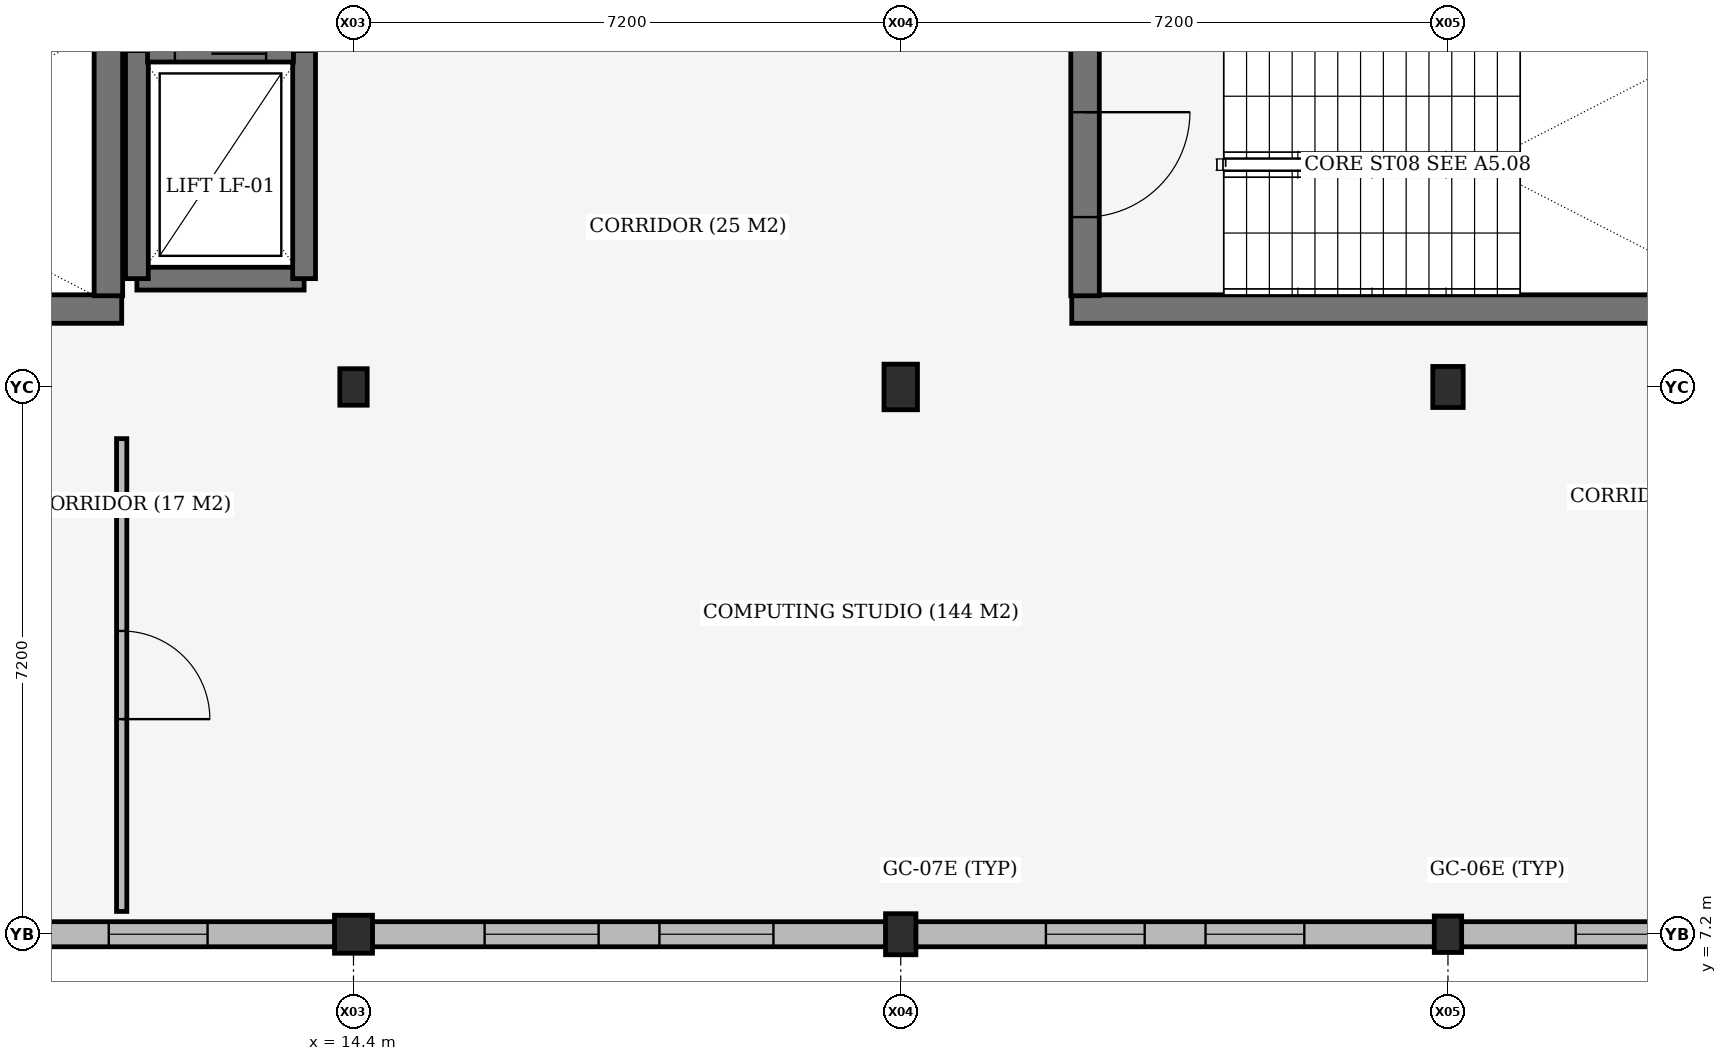
"""IFC4 building model, lengths in metres.
Left out: names, types, materials, properties, quantities, classifications, styles, units other than length and angle.
Written with IfcOpenShell. Run it as: python <this file> out.ifc"""

import sys

from ifc_helpers import new_model, si_unit, direction, frame, frame_2d, origin, origin_2d, place, context, subcontext, project, spatial, rectangle, extrude, element, fill, save


model = new_model("IFC4")
c1 = context("Model", 3, precision=1e-05, world=origin(), true_north=direction((0.0, 1.0)))
c2 = subcontext(c1, "Body", "Model", "MODEL_VIEW")
j1 = project(units=[si_unit("LENGTHUNIT", "METRE"), si_unit("PLANEANGLEUNIT", "RADIAN")], contexts=[c1])
p1 = place(None, origin())
s1 = spatial("IfcSite", under=j1, at=p1, CompositionType="ELEMENT")
p2 = place(p1, origin())
s2 = spatial("IfcBuilding", under=s1, at=p2, CompositionType="ELEMENT")
p3 = place(p2, frame((0.0, 0.0, 18.0)))
s3 = spatial("IfcBuildingStorey", under=s2, at=p3, CompositionType="ELEMENT", Elevation=18.0)
p4 = place(p3, frame((14.4, 7.2, 0.0), z_axis=(0.0, 0.0, 1.0), x_axis=(1.0, 0.0, 0.0)))
e1 = element("IfcColumn", 1, at=p4, inside=s3, PredefinedType="COLUMN", context=c2, shape_type="SweptSolid", body=[
    extrude(rectangle(XDim=0.5, YDim=0.5, at=origin_2d()), origin(), (0.0, 0.0, 1.0), 3.935),
])
p5 = place(p3, frame((14.4, 14.4, 0.0), z_axis=(0.0, 0.0, 1.0), x_axis=(1.0, 0.0, 0.0)))
e2 = element("IfcColumn", 2, at=p5, inside=s3, PredefinedType="COLUMN", context=c2, shape_type="SweptSolid", body=[
    extrude(rectangle(XDim=0.36, YDim=0.48, at=origin_2d()), origin(), (0.0, 0.0, 1.0), 3.935),
])
p6 = place(p3, frame((21.6, 7.2, 0.0), z_axis=(0.0, 0.0, 1.0), x_axis=(1.0, 0.0, 0.0)))
e3 = element("IfcColumn", 3, at=p6, inside=s3, PredefinedType="COLUMN", context=c2, shape_type="SweptSolid", body=[
    extrude(rectangle(XDim=0.4, YDim=0.54, at=origin_2d()), origin(), (0.0, 0.0, 1.0), 3.935),
])
p7 = place(p3, frame((21.6, 14.4, 0.0), z_axis=(0.0, 0.0, 1.0), x_axis=(1.0, 0.0, 0.0)))
e4 = element("IfcColumn", 4, at=p7, inside=s3, PredefinedType="COLUMN", context=c2, shape_type="SweptSolid", body=[
    extrude(rectangle(XDim=0.44, YDim=0.6, at=origin_2d()), origin(), (0.0, 0.0, 1.0), 3.935),
])
p8 = place(p3, frame((28.8, 7.2, 0.0), z_axis=(0.0, 0.0, 1.0), x_axis=(1.0, 0.0, 0.0)))
e5 = element("IfcColumn", 5, at=p8, inside=s3, PredefinedType="COLUMN", context=c2, shape_type="SweptSolid", body=[
    extrude(rectangle(XDim=0.36, YDim=0.48, at=origin_2d()), origin(), (0.0, 0.0, 1.0), 3.935),
])
p9 = place(p3, frame((28.8, 14.4, 0.0), z_axis=(0.0, 0.0, 1.0), x_axis=(1.0, 0.0, 0.0)))
e6 = element("IfcColumn", 6, at=p9, inside=s3, PredefinedType="COLUMN", context=c2, shape_type="SweptSolid", body=[
    extrude(rectangle(XDim=0.4, YDim=0.54, at=origin_2d()), origin(), (0.0, 0.0, 1.0), 3.935),
])
p10 = place(p3, frame((2.25, 15.425, 0.0), z_axis=(0.0, 0.0, 1.0), x_axis=(1.0, 0.0, 0.0)))
e7 = element("IfcWall", 7, at=p10, inside=s3, PredefinedType="SHEAR", context=c2, shape_type="SweptSolid", body=[
    extrude(rectangle(XDim=9.1, YDim=0.375, at=frame_2d((4.55, 0.0))), origin(), (0.0, 0.0, 1.0), 3.935),
])
p11 = place(p3, frame((11.175, 15.6, 0.0), z_axis=(0.0, 0.0, 1.0), x_axis=(0.0, 1.0, 0.0)))
e8 = element("IfcWall", 8, at=p11, inside=s3, PredefinedType="SHEAR", context=c2, shape_type="SweptSolid", body=[
    extrude(rectangle(XDim=3.45, YDim=0.375, at=frame_2d((1.725, 0.0))), origin(), (0.0, 0.0, 1.0), 3.935),
])
p12 = place(p3, frame((23.85, 15.425, 0.0), z_axis=(0.0, 0.0, 1.0), x_axis=(1.0, 0.0, 0.0)))
e9 = element("IfcWall", 9, at=p12, inside=s3, PredefinedType="SHEAR", context=c2, shape_type="SweptSolid", body=[
    extrude(rectangle(XDim=9.1, YDim=0.375, at=frame_2d((4.55, 0.0))), origin(), (0.0, 0.0, 1.0), 3.935),
])
p13 = place(p3, frame((11.55, 15.825, 0.0), z_axis=(0.0, 0.0, 1.0), x_axis=(1.0, 0.0, 0.0)))
e10 = element("IfcWall", 10, at=p13, inside=s3, PredefinedType="SHEAR", context=c2, shape_type="SweptSolid", body=[
    extrude(rectangle(XDim=2.2, YDim=0.3, at=frame_2d((1.1, 0.0))), origin(), (0.0, 0.0, 1.0), 3.935),
])
for number, where, z_axis, x_axis in (
    (11, (11.55, 18.825, 0.0), (0.0, 0.0, 1.0), (0.0, -1.0, 0.0)),
    (12, (13.75, 15.825, 0.0), (0.0, 0.0, 1.0), (0.0, 1.0, 0.0)),
):
    element("IfcWall", number, at=place(p3, frame(where, z_axis=z_axis, x_axis=x_axis)), inside=s3, PredefinedType="SHEAR", context=c2, shape_type="SweptSolid", body=[
        extrude(rectangle(XDim=3.0, YDim=0.3, at=frame_2d((1.5, 0.0))), origin(), (0.0, 0.0, 1.0), 3.935),
    ])
p14 = place(p3, frame((14.158, 7.2, 0.0), z_axis=(0.0, 0.0, 1.0), x_axis=(-1.0, 0.0, 0.0)))
e13 = element("IfcWall", 13, at=p14, inside=s3, PredefinedType="STANDARD", context=c2, shape_type="SweptSolid", body=[
    extrude(rectangle(XDim=6.756, YDim=0.33, at=frame_2d((3.378, 0.0))), origin(), (0.0, 0.0, 1.0), 3.255),
])
p15 = place(p14, frame((1.678, 0.0, 0.95)))
e14 = element("IfcOpeningElement", 14, at=p15, cuts=e13, PredefinedType="OPENING", context=c2, shape_type="SweptSolid", body=[
    extrude(rectangle(XDim=1.3, YDim=1.8, at=frame_2d((0.65, 0.9))), frame((0.0, 0.175, 0.0), z_axis=(0.0, -1.0, 0.0), x_axis=(1.0, 0.0, 0.0)), (0.0, 0.0, 1.0), 0.35),
])
p16 = place(p14, frame((3.778, 0.0, 0.95)))
e15 = element("IfcOpeningElement", 15, at=p16, cuts=e13, PredefinedType="OPENING", context=c2, shape_type="SweptSolid", body=[
    extrude(rectangle(XDim=1.3, YDim=1.8, at=frame_2d((0.65, 0.9))), frame((0.0, 0.175, 0.0), z_axis=(0.0, -1.0, 0.0), x_axis=(1.0, 0.0, 0.0)), (0.0, 0.0, 1.0), 0.35),
])
p17 = place(p3, frame((21.408, 7.2, 0.0), z_axis=(0.0, 0.0, 1.0), x_axis=(-1.0, 0.0, 0.0)))
e16 = element("IfcWall", 16, at=p17, inside=s3, PredefinedType="STANDARD", context=c2, shape_type="SweptSolid", body=[
    extrude(rectangle(XDim=6.766, YDim=0.33, at=frame_2d((3.383, 0.0))), origin(), (0.0, 0.0, 1.0), 3.195),
])
p18 = place(p17, frame((1.483, 0.0, 0.95)))
e17 = element("IfcOpeningElement", 17, at=p18, cuts=e16, PredefinedType="OPENING", context=c2, shape_type="SweptSolid", body=[
    extrude(rectangle(XDim=1.5, YDim=1.8, at=frame_2d((0.75, 0.9))), frame((0.0, 0.175, 0.0), z_axis=(0.0, -1.0, 0.0), x_axis=(1.0, 0.0, 0.0)), (0.0, 0.0, 1.0), 0.35),
])
p19 = place(p17, frame((3.783, 0.0, 0.95)))
e18 = element("IfcOpeningElement", 18, at=p19, cuts=e16, PredefinedType="OPENING", context=c2, shape_type="SweptSolid", body=[
    extrude(rectangle(XDim=1.5, YDim=1.8, at=frame_2d((0.75, 0.9))), frame((0.0, 0.175, 0.0), z_axis=(0.0, -1.0, 0.0), x_axis=(1.0, 0.0, 0.0)), (0.0, 0.0, 1.0), 0.35),
])
p20 = place(p3, frame((28.628, 7.2, 0.0), z_axis=(0.0, 0.0, 1.0), x_axis=(-1.0, 0.0, 0.0)))
e19 = element("IfcWall", 19, at=p20, inside=s3, PredefinedType="STANDARD", context=c2, shape_type="SweptSolid", body=[
    extrude(rectangle(XDim=6.836, YDim=0.33, at=frame_2d((3.418, 0.0))), origin(), (0.0, 0.0, 1.0), 3.415),
])
p21 = place(p20, frame((1.718, 0.0, 0.95)))
e20 = element("IfcOpeningElement", 20, at=p21, cuts=e19, PredefinedType="OPENING", context=c2, shape_type="SweptSolid", body=[
    extrude(rectangle(XDim=1.3, YDim=1.8, at=frame_2d((0.65, 0.9))), frame((0.0, 0.175, 0.0), z_axis=(0.0, -1.0, 0.0), x_axis=(1.0, 0.0, 0.0)), (0.0, 0.0, 1.0), 0.35),
])
p22 = place(p20, frame((3.818, 0.0, 0.95)))
e21 = element("IfcOpeningElement", 21, at=p22, cuts=e19, PredefinedType="OPENING", context=c2, shape_type="SweptSolid", body=[
    extrude(rectangle(XDim=1.3, YDim=1.8, at=frame_2d((0.65, 0.9))), frame((0.0, 0.175, 0.0), z_axis=(0.0, -1.0, 0.0), x_axis=(1.0, 0.0, 0.0)), (0.0, 0.0, 1.0), 0.35),
])
p23 = place(p3, frame((35.788, 7.2, 0.0), z_axis=(0.0, 0.0, 1.0), x_axis=(-1.0, 0.0, 0.0)))
e22 = element("IfcWall", 22, at=p23, inside=s3, PredefinedType="STANDARD", context=c2, shape_type="SweptSolid", body=[
    extrude(rectangle(XDim=6.816, YDim=0.33, at=frame_2d((3.408, 0.0))), origin(), (0.0, 0.0, 1.0), 3.355),
])
p24 = place(p23, frame((1.508, 0.0, 0.95)))
e23 = element("IfcOpeningElement", 23, at=p24, cuts=e22, PredefinedType="OPENING", context=c2, shape_type="SweptSolid", body=[
    extrude(rectangle(XDim=1.5, YDim=1.8, at=frame_2d((0.75, 0.9))), frame((0.0, 0.175, 0.0), z_axis=(0.0, -1.0, 0.0), x_axis=(1.0, 0.0, 0.0)), (0.0, 0.0, 1.0), 0.35),
])
p25 = place(p23, frame((3.808, 0.0, 0.95)))
e24 = element("IfcOpeningElement", 24, at=p25, cuts=e22, PredefinedType="OPENING", context=c2, shape_type="SweptSolid", body=[
    extrude(rectangle(XDim=1.5, YDim=1.8, at=frame_2d((0.75, 0.9))), frame((0.0, 0.175, 0.0), z_axis=(0.0, -1.0, 0.0), x_axis=(1.0, 0.0, 0.0)), (0.0, 0.0, 1.0), 0.35),
])
p26 = place(p3, frame((24.025, 19.05, 0.0), z_axis=(0.0, 0.0, 1.0), x_axis=(0.0, -1.0, 0.0)))
e25 = element("IfcWall", 25, at=p26, inside=s3, PredefinedType="SHEAR", context=c2, shape_type="SweptSolid", body=[
    extrude(rectangle(XDim=3.45, YDim=0.375, at=frame_2d((1.725, 0.0))), origin(), (0.0, 0.0, 1.0), 3.935),
])
p27 = place(p26, frame((1.035, 0.0, 0.0)))
e26 = element("IfcOpeningElement", 26, at=p27, cuts=e25, PredefinedType="OPENING", context=c2, shape_type="SweptSolid", body=[
    extrude(rectangle(XDim=1.38, YDim=2.2, at=frame_2d((0.69, 1.1))), frame((0.0, 0.198, 0.0), z_axis=(0.0, -1.0, 0.0), x_axis=(1.0, 0.0, 0.0)), (0.0, 0.0, 1.0), 0.395),
])
p28 = place(p3, frame((11.69, 18.825, 0.0), z_axis=(0.0, 0.0, 1.0), x_axis=(1.0, 0.0, 0.0)))
e27 = element("IfcWall", 27, at=p28, inside=s3, PredefinedType="SHEAR", context=c2, shape_type="SweptSolid", body=[
    extrude(rectangle(XDim=1.92, YDim=0.3, at=frame_2d((0.96, 0.0))), origin(), (0.0, 0.0, 1.0), 3.935),
])
p29 = place(p28, frame((0.36, 0.0, 0.0)))
e28 = element("IfcOpeningElement", 28, at=p29, cuts=e27, PredefinedType="OPENING", context=c2, shape_type="SweptSolid", body=[
    extrude(rectangle(XDim=1.2, YDim=2.1, at=frame_2d((0.6, 1.05))), frame((0.0, 0.16, 0.0), z_axis=(0.0, -1.0, 0.0), x_axis=(1.0, 0.0, 0.0)), (0.0, 0.0, 1.0), 0.32),
])
p30 = place(p3, frame((11.35, 7.5, 0.0), z_axis=(0.0, 0.0, 1.0), x_axis=(0.0, 1.0, 0.0)))
e29 = element("IfcWall", 29, at=p30, inside=s3, PredefinedType="PARTITIONING", context=c2, shape_type="SweptSolid", body=[
    extrude(rectangle(XDim=6.22, YDim=0.135, at=frame_2d((3.11, 0.0))), origin(), (0.0, 0.0, 1.0), 3.935),
])
p31 = place(p30, frame((2.53, 0.0, 0.0)))
e30 = element("IfcOpeningElement", 30, at=p31, cuts=e29, PredefinedType="OPENING", context=c2, shape_type="SweptSolid", body=[
    extrude(rectangle(XDim=1.16, YDim=2.2, at=frame_2d((0.58, 1.1))), frame((0.0, 0.077, 0.0), z_axis=(0.0, -1.0, 0.0), x_axis=(1.0, 0.0, 0.0)), (0.0, 0.0, 1.0), 0.155),
])
p32 = place(p15, origin())
e31 = element("IfcWindow", 31, at=p32, inside=s3, PartitioningType="DOUBLE_PANEL_VERTICAL", PredefinedType="WINDOW", context=c2, shape_type="SweptSolid", body=[
    extrude(rectangle(XDim=1.3, YDim=1.8, at=frame_2d((0.65, 0.9))), frame((0.0, 0.03, 0.0), z_axis=(0.0, -1.0, 0.0), x_axis=(1.0, 0.0, 0.0)), (0.0, 0.0, 1.0), 0.06),
])
fill(e14, e31)
p33 = place(p18, origin())
e32 = element("IfcWindow", 32, at=p33, inside=s3, PartitioningType="DOUBLE_PANEL_VERTICAL", PredefinedType="WINDOW", context=c2, shape_type="SweptSolid", body=[
    extrude(rectangle(XDim=1.5, YDim=1.8, at=frame_2d((0.75, 0.9))), frame((0.0, 0.03, 0.0), z_axis=(0.0, -1.0, 0.0), x_axis=(1.0, 0.0, 0.0)), (0.0, 0.0, 1.0), 0.06),
])
fill(e17, e32)
p34 = place(p19, origin())
e33 = element("IfcWindow", 33, at=p34, inside=s3, PartitioningType="DOUBLE_PANEL_VERTICAL", PredefinedType="WINDOW", context=c2, shape_type="SweptSolid", body=[
    extrude(rectangle(XDim=1.5, YDim=1.8, at=frame_2d((0.75, 0.9))), frame((0.0, 0.03, 0.0), z_axis=(0.0, -1.0, 0.0), x_axis=(1.0, 0.0, 0.0)), (0.0, 0.0, 1.0), 0.06),
])
fill(e18, e33)
p35 = place(p21, origin())
e34 = element("IfcWindow", 34, at=p35, inside=s3, PartitioningType="DOUBLE_PANEL_VERTICAL", PredefinedType="WINDOW", context=c2, shape_type="SweptSolid", body=[
    extrude(rectangle(XDim=1.3, YDim=1.8, at=frame_2d((0.65, 0.9))), frame((0.0, 0.03, 0.0), z_axis=(0.0, -1.0, 0.0), x_axis=(1.0, 0.0, 0.0)), (0.0, 0.0, 1.0), 0.06),
])
fill(e20, e34)
p36 = place(p22, origin())
e35 = element("IfcWindow", 35, at=p36, inside=s3, PartitioningType="DOUBLE_PANEL_VERTICAL", PredefinedType="WINDOW", context=c2, shape_type="SweptSolid", body=[
    extrude(rectangle(XDim=1.3, YDim=1.8, at=frame_2d((0.65, 0.9))), frame((0.0, 0.03, 0.0), z_axis=(0.0, -1.0, 0.0), x_axis=(1.0, 0.0, 0.0)), (0.0, 0.0, 1.0), 0.06),
])
fill(e21, e35)
p37 = place(p25, origin())
e36 = element("IfcWindow", 36, at=p37, inside=s3, PartitioningType="DOUBLE_PANEL_VERTICAL", PredefinedType="WINDOW", context=c2, shape_type="SweptSolid", body=[
    extrude(rectangle(XDim=1.5, YDim=1.8, at=frame_2d((0.75, 0.9))), frame((0.0, 0.03, 0.0), z_axis=(0.0, -1.0, 0.0), x_axis=(1.0, 0.0, 0.0)), (0.0, 0.0, 1.0), 0.06),
])
fill(e24, e36)
p38 = place(p27, origin())
e37 = element("IfcDoor", 37, at=p38, inside=s3, OperationType="DOUBLE_DOOR_SINGLE_SWING", PredefinedType="DOOR", context=c2, shape_type="SweptSolid", body=[
    extrude(rectangle(XDim=1.38, YDim=2.2, at=frame_2d((0.69, 1.1))), frame((0.0, 0.025, 0.0), z_axis=(0.0, -1.0, 0.0), x_axis=(1.0, 0.0, 0.0)), (0.0, 0.0, 1.0), 0.05),
])
fill(e26, e37)
p39 = place(p29, origin())
e38 = element("IfcDoor", 38, at=p39, inside=s3, OperationType="SLIDING_TO_LEFT", PredefinedType="DOOR", context=c2, shape_type="SweptSolid", body=[
    extrude(rectangle(XDim=1.2, YDim=2.1, at=frame_2d((0.6, 1.05))), frame((0.0, 0.025, 0.0), z_axis=(0.0, -1.0, 0.0), x_axis=(1.0, 0.0, 0.0)), (0.0, 0.0, 1.0), 0.05),
])
fill(e28, e38)
p40 = place(p31, origin())
e39 = element("IfcDoor", 39, at=p40, inside=s3, OperationType="SINGLE_SWING_RIGHT", PredefinedType="DOOR", context=c2, shape_type="SweptSolid", body=[
    extrude(rectangle(XDim=1.16, YDim=2.2, at=frame_2d((0.58, 1.1))), frame((0.0, 0.025, 0.0), z_axis=(0.0, -1.0, 0.0), x_axis=(1.0, 0.0, 0.0)), (0.0, 0.0, 1.0), 0.05),
])
fill(e30, e39)
save(model, sys.argv[1])
